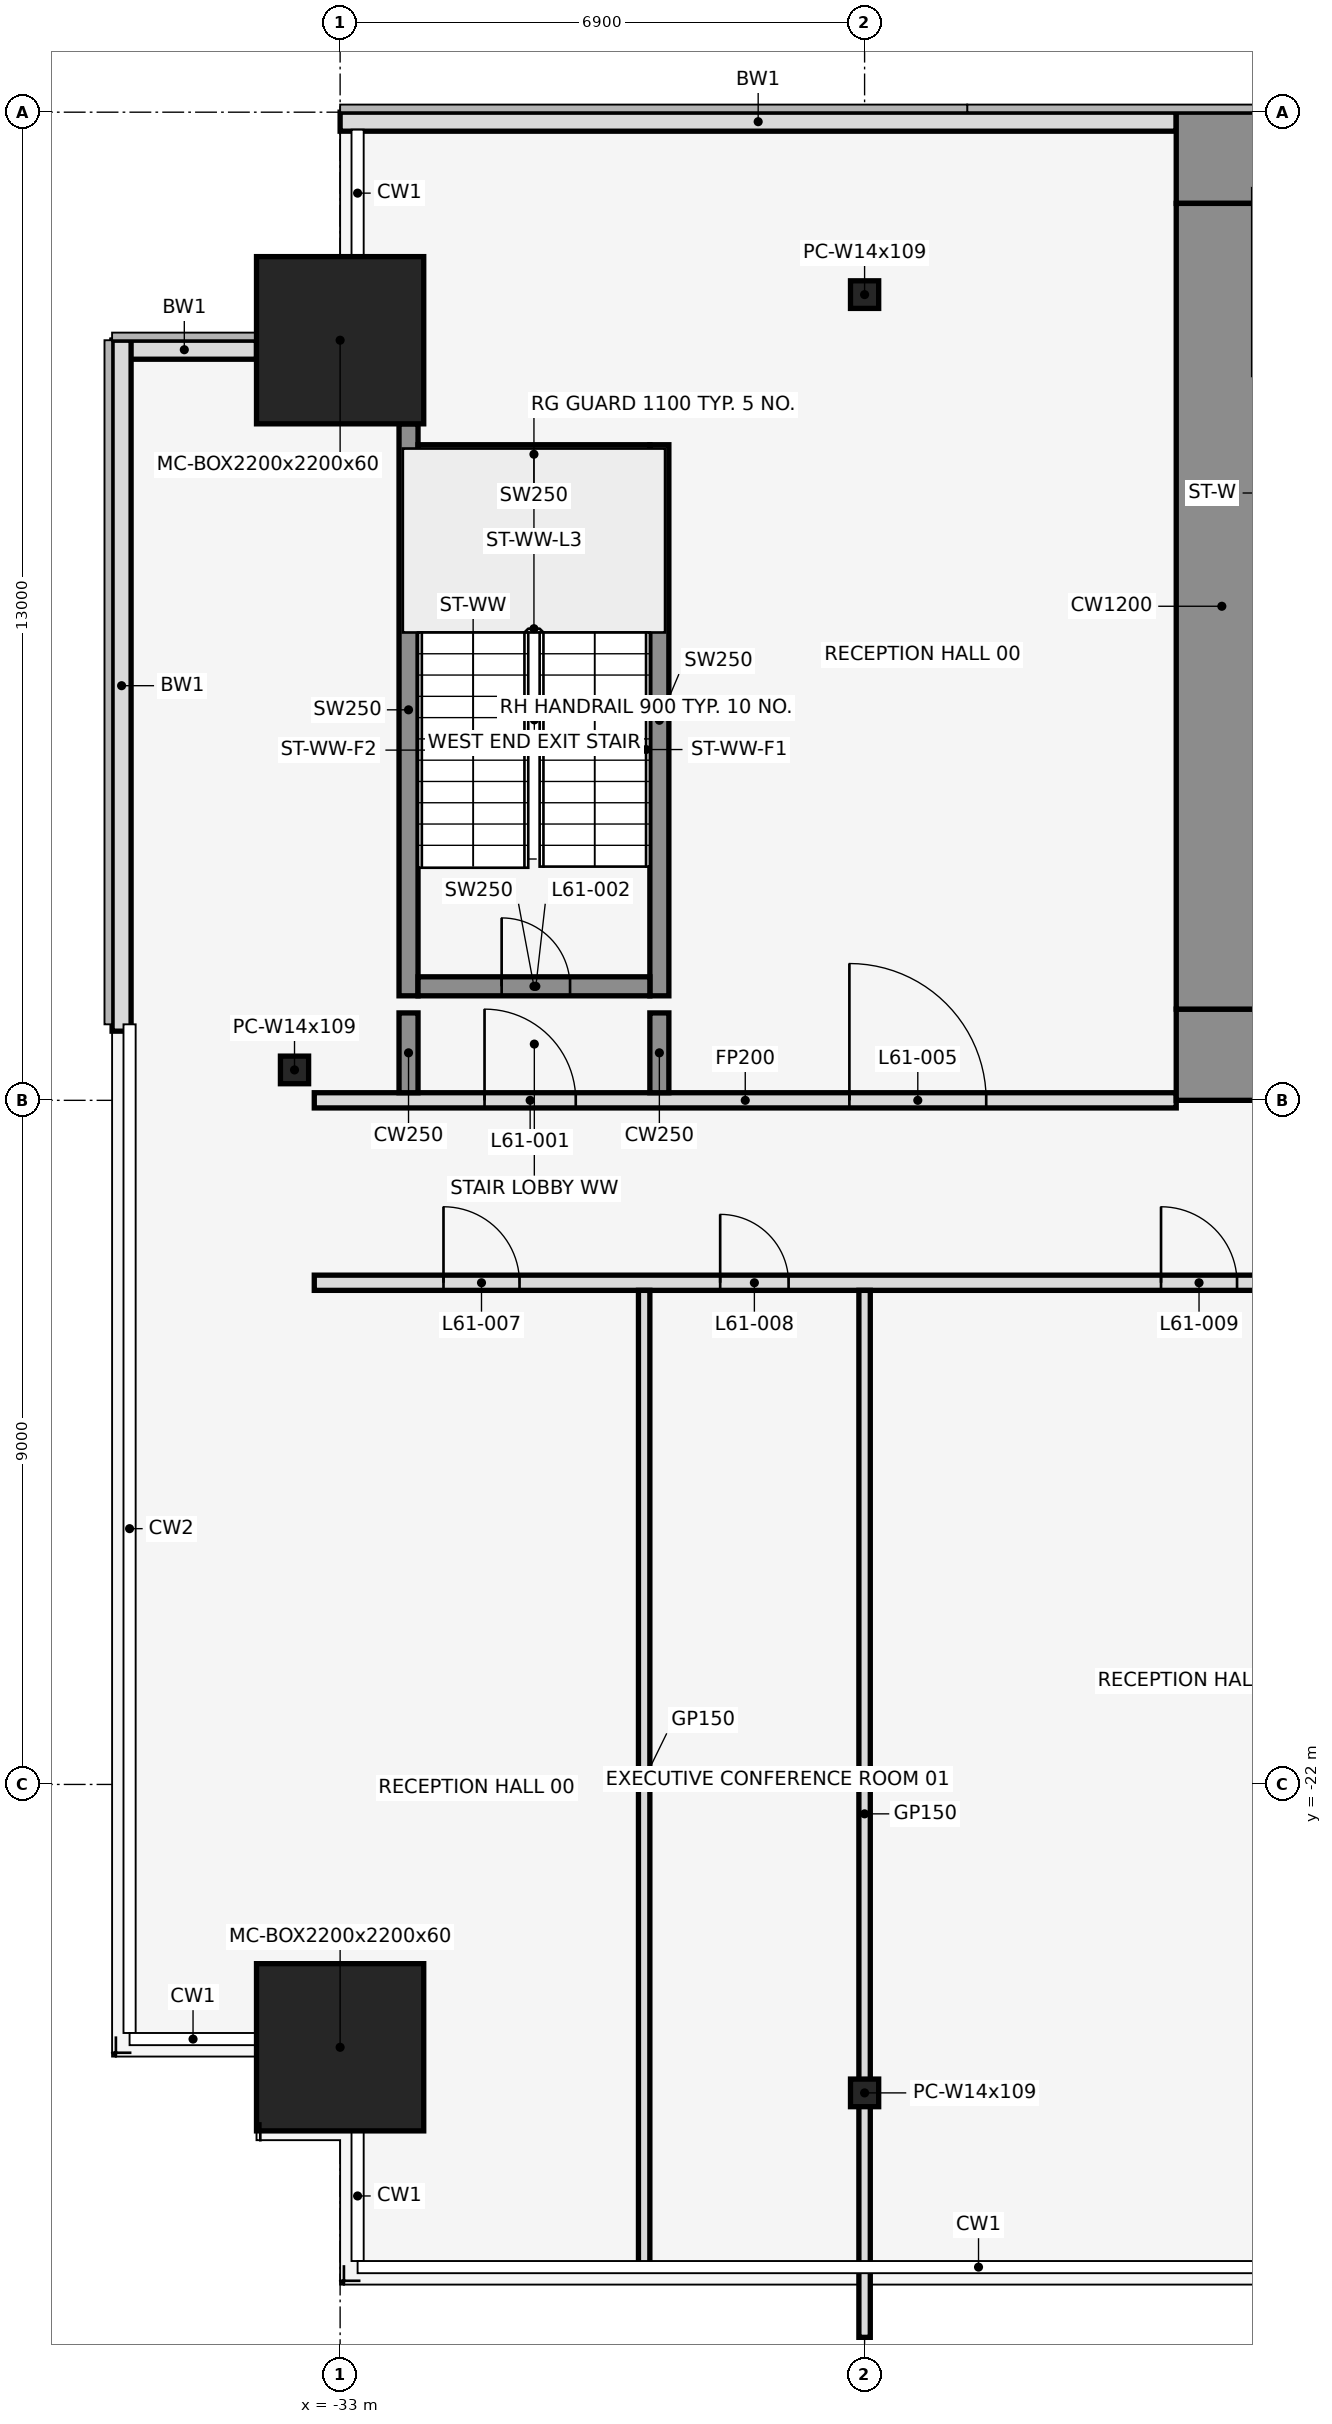
"""IFC4 building model, lengths in metres.
Left out: names, types, materials, properties, quantities, classifications, styles, units other than length and angle.
Written with IfcOpenShell. Run it as: python <this file> out.ifc"""

import sys

from ifc_helpers import new_model, si_unit, direction, frame, frame_2d, origin, origin_2d, place, context, subcontext, project, spatial, rectangle, hollow_rectangle, i_section, extrude, element, fill, save


model = new_model("IFC4")
c1 = context("Model", 3, precision=1e-05, world=origin(), true_north=direction((0.0, 1.0)))
c2 = subcontext(c1, "Body", "Model", "MODEL_VIEW")
j1 = project(units=[si_unit("LENGTHUNIT", "METRE"), si_unit("PLANEANGLEUNIT", "RADIAN")], contexts=[c1])
p1 = place(None, origin())
s1 = spatial("IfcSite", under=j1, at=p1, CompositionType="ELEMENT")
p2 = place(p1, origin())
s2 = spatial("IfcBuilding", under=s1, at=p2, CompositionType="ELEMENT")
p3 = place(p2, frame((0.0, 0.0, 270.8)))
s3 = spatial("IfcBuildingStorey", under=s2, at=p3, CompositionType="ELEMENT", Elevation=270.8)
for number, where, z_axis, x_axis in (
    (1, (-33.0, -25.458, 0.0), (0.0, 0.0, 1.0), (1.0, 0.0, 0.0)),
    (2, (-33.0, -3.0, 0.0), (0.0, 0.0, 1.0), (1.0, 0.0, 0.0)),
):
    element("IfcColumn", number, at=place(p3, frame(where, z_axis=z_axis, x_axis=x_axis)), inside=s3, PredefinedType="COLUMN", context=c2, shape_type="SweptSolid", body=[
        extrude(hollow_rectangle(XDim=2.2, YDim=2.2, WallThickness=0.06, at=origin_2d()), origin(), (0.0, 0.0, 1.0), 4.2),
    ])
for number, where, z_axis, x_axis in (
    (3, (-26.1, -26.058, 0.0), (0.0, 0.0, 1.0), (1.0, 0.0, 0.0)),
    (4, (-26.1, -2.4, 0.0), (0.0, 0.0, 1.0), (1.0, 0.0, 0.0)),
    (5, (-33.6, -12.6, 0.0), (0.0, 0.0, 1.0), (1.0, 0.0, 0.0)),
):
    element("IfcColumn", number, at=place(p3, frame(where, z_axis=z_axis, x_axis=x_axis)), inside=s3, PredefinedType="COLUMN", context=c2, shape_type="SweptSolid", body=[
        extrude(i_section(OverallWidth=0.371, OverallDepth=0.363, WebThickness=0.013, FlangeThickness=0.022, at=origin_2d()), origin(), (0.0, 0.0, 1.0), 4.2),
    ])
p4 = place(p3, frame((-22.0, -0.125, 0.0), z_axis=(0.0, 0.0, 1.0), x_axis=(-1.0, 0.0, 0.0)))
e6 = element("IfcWall", 6, at=p4, inside=s3, PredefinedType="STANDARD", context=c2, shape_type="SweptSolid", body=[
    extrude(rectangle(XDim=11.0, YDim=0.25, at=frame_2d((5.5, 0.0))), origin(), (0.0, 0.0, 1.0), 4.05),
])
p5 = place(p3, frame((-34.1, -3.125, 0.0), z_axis=(0.0, 0.0, 1.0), x_axis=(-1.0, 0.0, 0.0)))
e7 = element("IfcWall", 7, at=p5, inside=s3, PredefinedType="STANDARD", context=c2, shape_type="SweptSolid", body=[
    extrude(rectangle(XDim=1.9, YDim=0.25, at=frame_2d((0.95, 0.0))), origin(), (0.0, 0.0, 1.0), 4.05),
])
p6 = place(p3, frame((-35.875, -3.0, 0.0), z_axis=(0.0, 0.0, 1.0), x_axis=(0.0, -1.0, 0.0)))
e8 = element("IfcWall", 8, at=p6, inside=s3, PredefinedType="STANDARD", context=c2, shape_type="SweptSolid", body=[
    extrude(rectangle(XDim=9.09, YDim=0.25, at=frame_2d((4.545, 0.0))), origin(), (0.0, 0.0, 1.0), 4.05),
])
p7 = place(p3, frame((-32.1, -11.625, 0.0), z_axis=(0.0, 0.0, 1.0), x_axis=(0.0, 1.0, 0.0)))
e9 = element("IfcWall", 9, at=p7, inside=s3, PredefinedType="SHEAR", context=c2, shape_type="SweptSolid", body=[
    extrude(rectangle(XDim=7.525, YDim=0.25, at=frame_2d((3.762, 0.0))), origin(), (0.0, 0.0, 1.0), 4.2),
])
p8 = place(p3, frame((-28.8, -11.625, 0.0), z_axis=(0.0, 0.0, 1.0), x_axis=(0.0, 1.0, 0.0)))
e10 = element("IfcWall", 10, at=p8, inside=s3, PredefinedType="SHEAR", context=c2, shape_type="SweptSolid", body=[
    extrude(rectangle(XDim=7.25, YDim=0.25, at=frame_2d((3.625, 0.0))), origin(), (0.0, 0.0, 1.0), 4.2),
])
p9 = place(p3, frame((-31.975, -11.5, 0.0), z_axis=(0.0, 0.0, 1.0), x_axis=(1.0, 0.0, 0.0)))
e11 = element("IfcWall", 11, at=p9, inside=s3, PredefinedType="SHEAR", context=c2, shape_type="SweptSolid", body=[
    extrude(rectangle(XDim=3.05, YDim=0.25, at=frame_2d((1.525, 0.0))), origin(), (0.0, 0.0, 1.0), 4.2),
])
p10 = place(p9, frame((1.1, 0.0, 0.0)))
e12 = element("IfcOpeningElement", 12, at=p10, cuts=e11, PredefinedType="OPENING", context=c2, shape_type="SweptSolid", body=[
    extrude(rectangle(XDim=0.9, YDim=2.1, at=frame_2d((0.45, 1.05))), frame((0.0, 0.137, 0.0), z_axis=(0.0, -1.0, 0.0), x_axis=(1.0, 0.0, 0.0)), (0.0, 0.0, 1.0), 0.274),
])
p11 = place(p3, frame((-31.975, -4.5, 0.0), z_axis=(0.0, 0.0, 1.0), x_axis=(1.0, 0.0, 0.0)))
e13 = element("IfcWall", 13, at=p11, inside=s3, PredefinedType="SHEAR", context=c2, shape_type="SweptSolid", body=[
    extrude(rectangle(XDim=3.05, YDim=0.25, at=frame_2d((1.525, 0.0))), origin(), (0.0, 0.0, 1.0), 4.2),
])
p12 = place(p3, frame((-33.34, -15.4, 0.0), z_axis=(0.0, 0.0, 1.0), x_axis=(1.0, 0.0, 0.0)))
e14 = element("IfcWall", 14, at=p12, inside=s3, PredefinedType="PARTITIONING", context=c2, shape_type="SweptSolid", body=[
    extrude(rectangle(XDim=31.94, YDim=0.2, at=frame_2d((15.97, 0.0))), origin(), (0.0, 0.0, 1.0), 3.118),
])
p13 = place(p12, frame((1.7, 0.0, 0.0)))
e15 = element("IfcOpeningElement", 15, at=p13, cuts=e14, PredefinedType="OPENING", context=c2, shape_type="SweptSolid", body=[
    extrude(rectangle(XDim=1.0, YDim=2.1, at=frame_2d((0.5, 1.05))), frame((0.0, 0.112, 0.0), z_axis=(0.0, -1.0, 0.0), x_axis=(1.0, 0.0, 0.0)), (0.0, 0.0, 1.0), 0.224),
])
p14 = place(p12, frame((5.34, 0.0, 0.0)))
e16 = element("IfcOpeningElement", 16, at=p14, cuts=e14, PredefinedType="OPENING", context=c2, shape_type="SweptSolid", body=[
    extrude(rectangle(XDim=0.9, YDim=2.1, at=frame_2d((0.45, 1.05))), frame((0.0, 0.112, 0.0), z_axis=(0.0, -1.0, 0.0), x_axis=(1.0, 0.0, 0.0)), (0.0, 0.0, 1.0), 0.224),
])
p15 = place(p12, frame((11.14, 0.0, 0.0)))
e17 = element("IfcOpeningElement", 17, at=p15, cuts=e14, PredefinedType="OPENING", context=c2, shape_type="SweptSolid", body=[
    extrude(rectangle(XDim=1.0, YDim=2.1, at=frame_2d((0.5, 1.05))), frame((0.0, 0.112, 0.0), z_axis=(0.0, -1.0, 0.0), x_axis=(1.0, 0.0, 0.0)), (0.0, 0.0, 1.0), 0.224),
])
p16 = place(p12, frame((18.34, 0.0, 0.0)))
e18 = element("IfcOpeningElement", 18, at=p16, cuts=e14, PredefinedType="OPENING", context=c2, shape_type="SweptSolid", body=[
    extrude(rectangle(XDim=1.0, YDim=2.1, at=frame_2d((0.5, 1.05))), frame((0.0, 0.112, 0.0), z_axis=(0.0, -1.0, 0.0), x_axis=(1.0, 0.0, 0.0)), (0.0, 0.0, 1.0), 0.224),
])
p17 = place(p3, frame((-33.34, -13.0, 0.0), z_axis=(0.0, 0.0, 1.0), x_axis=(1.0, 0.0, 0.0)))
e19 = element("IfcWall", 19, at=p17, inside=s3, PredefinedType="PARTITIONING", context=c2, shape_type="SweptSolid", body=[
    extrude(rectangle(XDim=11.34, YDim=0.2, at=frame_2d((5.67, 0.0))), origin(), (0.0, 0.0, 1.0), 3.118),
])
p18 = place(p17, frame((2.24, 0.0, 0.0)))
e20 = element("IfcOpeningElement", 20, at=p18, cuts=e19, PredefinedType="OPENING", context=c2, shape_type="SweptSolid", body=[
    extrude(rectangle(XDim=1.2, YDim=2.1, at=frame_2d((0.6, 1.05))), frame((0.0, 0.112, 0.0), z_axis=(0.0, -1.0, 0.0), x_axis=(1.0, 0.0, 0.0)), (0.0, 0.0, 1.0), 0.224),
])
p19 = place(p17, frame((7.04, 0.0, 0.0)))
e21 = element("IfcOpeningElement", 21, at=p19, cuts=e19, PredefinedType="OPENING", context=c2, shape_type="SweptSolid", body=[
    extrude(rectangle(XDim=1.8, YDim=2.1, at=frame_2d((0.9, 1.05))), frame((0.0, 0.112, 0.0), z_axis=(0.0, -1.0, 0.0), x_axis=(1.0, 0.0, 0.0)), (0.0, 0.0, 1.0), 0.224),
])
p20 = place(p3, frame((-32.1, -12.9, 0.0), z_axis=(0.0, 0.0, 1.0), x_axis=(0.0, 1.0, 0.0)))
e22 = element("IfcWall", 22, at=p20, inside=s3, PredefinedType="SHEAR", context=c2, shape_type="SweptSolid", body=[
    extrude(rectangle(XDim=1.05, YDim=0.25, at=frame_2d((0.525, 0.0))), origin(), (0.0, 0.0, 1.0), 4.2),
])
p21 = place(p3, frame((-29.0, -28.37, 0.0), z_axis=(0.0, 0.0, 1.0), x_axis=(0.0, 1.0, 0.0)))
e23 = element("IfcWall", 23, at=p21, inside=s3, PredefinedType="PARTITIONING", context=c2, shape_type="SweptSolid", body=[
    extrude(rectangle(XDim=12.87, YDim=0.15, at=frame_2d((6.435, 0.0))), origin(), (0.0, 0.0, 1.0), 3.118),
])
p22 = place(p3, frame((-28.8, -12.9, 0.0), z_axis=(0.0, 0.0, 1.0), x_axis=(0.0, 1.0, 0.0)))
e24 = element("IfcWall", 24, at=p22, inside=s3, PredefinedType="SHEAR", context=c2, shape_type="SweptSolid", body=[
    extrude(rectangle(XDim=1.05, YDim=0.25, at=frame_2d((0.525, 0.0))), origin(), (0.0, 0.0, 1.0), 4.2),
])
p23 = place(p3, frame((-26.1, -29.274, 0.0), z_axis=(0.0, 0.0, 1.0), x_axis=(0.0, 1.0, 0.0)))
e25 = element("IfcWall", 25, at=p23, inside=s3, PredefinedType="PARTITIONING", context=c2, shape_type="SweptSolid", body=[
    extrude(rectangle(XDim=13.774, YDim=0.15, at=frame_2d((6.887, 0.0))), origin(), (0.0, 0.0, 1.0), 3.118),
])
p24 = place(p3, frame((-22.0, -0.6, 0.0), z_axis=(0.0, 0.0, 1.0), x_axis=(1.0, 0.0, 0.0)))
e26 = element("IfcWall", 26, at=p24, inside=s3, PredefinedType="SHEAR", context=c2, shape_type="SweptSolid", body=[
    extrude(rectangle(XDim=44.0, YDim=1.2, at=frame_2d((22.0, 0.0))), origin(), (0.0, 0.0, 1.0), 4.2),
])
p25 = place(p24, frame((18.55, 0.0, 0.0)))
e27 = element("IfcOpeningElement", 27, at=p25, cuts=e26, PredefinedType="OPENING", context=c2, shape_type="SweptSolid", body=[
    extrude(rectangle(XDim=0.9, YDim=2.1, at=frame_2d((0.45, 1.05))), frame((0.0, 0.612, 0.0), z_axis=(0.0, -1.0, 0.0), x_axis=(1.0, 0.0, 0.0)), (0.0, 0.0, 1.0), 1.224),
])
p26 = place(p24, frame((24.55, 0.0, 0.0)))
e28 = element("IfcOpeningElement", 28, at=p26, cuts=e26, PredefinedType="OPENING", context=c2, shape_type="SweptSolid", body=[
    extrude(rectangle(XDim=0.9, YDim=2.1, at=frame_2d((0.45, 1.05))), frame((0.0, 0.612, 0.0), z_axis=(0.0, -1.0, 0.0), x_axis=(1.0, 0.0, 0.0)), (0.0, 0.0, 1.0), 1.224),
])
p27 = place(p3, frame((-22.0, -12.4, 0.0), z_axis=(0.0, 0.0, 1.0), x_axis=(1.0, 0.0, 0.0)))
e29 = element("IfcWall", 29, at=p27, inside=s3, PredefinedType="SHEAR", context=c2, shape_type="SweptSolid", body=[
    extrude(rectangle(XDim=44.0, YDim=1.2, at=frame_2d((22.0, 0.0))), origin(), (0.0, 0.0, 1.0), 4.2),
])
p28 = place(p27, frame((2.2, 0.0, 0.0)))
e30 = element("IfcOpeningElement", 30, at=p28, cuts=e29, PredefinedType="OPENING", context=c2, shape_type="SweptSolid", body=[
    extrude(rectangle(XDim=1.2, YDim=2.1, at=frame_2d((0.6, 1.05))), frame((0.0, 0.612, 0.0), z_axis=(0.0, -1.0, 0.0), x_axis=(1.0, 0.0, 0.0)), (0.0, 0.0, 1.0), 1.224),
])
p29 = place(p27, frame((21.4, 0.0, 0.0)))
e31 = element("IfcOpeningElement", 31, at=p29, cuts=e29, PredefinedType="OPENING", context=c2, shape_type="SweptSolid", body=[
    extrude(rectangle(XDim=1.2, YDim=2.1, at=frame_2d((0.6, 1.05))), frame((0.0, 0.612, 0.0), z_axis=(0.0, -1.0, 0.0), x_axis=(1.0, 0.0, 0.0)), (0.0, 0.0, 1.0), 1.224),
])
p30 = place(p27, frame((40.6, 0.0, 0.0)))
e32 = element("IfcOpeningElement", 32, at=p30, cuts=e29, PredefinedType="OPENING", context=c2, shape_type="SweptSolid", body=[
    extrude(rectangle(XDim=1.2, YDim=2.1, at=frame_2d((0.6, 1.05))), frame((0.0, 0.612, 0.0), z_axis=(0.0, -1.0, 0.0), x_axis=(1.0, 0.0, 0.0)), (0.0, 0.0, 1.0), 1.224),
])
p31 = place(p27, frame((16.0, 0.0, 0.0)))
e33 = element("IfcOpeningElement", 33, at=p31, cuts=e29, PredefinedType="OPENING", context=c2, shape_type="SweptSolid", body=[
    extrude(rectangle(XDim=1.8, YDim=2.1, at=frame_2d((0.9, 1.05))), frame((0.0, 0.612, 0.0), z_axis=(0.0, -1.0, 0.0), x_axis=(1.0, 0.0, 0.0)), (0.0, 0.0, 1.0), 1.224),
])
p32 = place(p27, frame((6.3, 0.0, 0.0)))
e34 = element("IfcOpeningElement", 34, at=p32, cuts=e29, PredefinedType="OPENING", context=c2, shape_type="SweptSolid", body=[
    extrude(rectangle(XDim=1.2, YDim=2.1, at=frame_2d((0.6, 1.05))), frame((0.0, 0.612, 0.0), z_axis=(0.0, -1.0, 0.0), x_axis=(1.0, 0.0, 0.0)), (0.0, 0.0, 1.0), 1.224),
])
p33 = place(p27, frame((26.2, 0.0, 0.0)))
e35 = element("IfcOpeningElement", 35, at=p33, cuts=e29, PredefinedType="OPENING", context=c2, shape_type="SweptSolid", body=[
    extrude(rectangle(XDim=1.8, YDim=2.1, at=frame_2d((0.9, 1.05))), frame((0.0, 0.612, 0.0), z_axis=(0.0, -1.0, 0.0), x_axis=(1.0, 0.0, 0.0)), (0.0, 0.0, 1.0), 1.224),
])
p34 = place(p27, frame((36.5, 0.0, 0.0)))
e36 = element("IfcOpeningElement", 36, at=p34, cuts=e29, PredefinedType="OPENING", context=c2, shape_type="SweptSolid", body=[
    extrude(rectangle(XDim=1.2, YDim=2.1, at=frame_2d((0.6, 1.05))), frame((0.0, 0.612, 0.0), z_axis=(0.0, -1.0, 0.0), x_axis=(1.0, 0.0, 0.0)), (0.0, 0.0, 1.0), 1.224),
])
p35 = place(p3, frame((-21.4, -11.8, 0.0), z_axis=(0.0, 0.0, 1.0), x_axis=(0.0, 1.0, 0.0)))
e37 = element("IfcWall", 37, at=p35, inside=s3, PredefinedType="SHEAR", context=c2, shape_type="SweptSolid", body=[
    extrude(rectangle(XDim=10.6, YDim=1.2, at=frame_2d((5.3, 0.0))), origin(), (0.0, 0.0, 1.0), 4.2),
])
p36 = place(p18, origin())
e38 = element("IfcDoor", 38, at=p36, inside=s3, OperationType="SINGLE_SWING_LEFT", PredefinedType="DOOR", context=c2, shape_type="SweptSolid", body=[
    extrude(rectangle(XDim=1.2, YDim=2.1, at=frame_2d((0.6, 1.05))), frame((0.0, 0.025, 0.0), z_axis=(0.0, -1.0, 0.0), x_axis=(1.0, 0.0, 0.0)), (0.0, 0.0, 1.0), 0.05),
])
fill(e20, e38)
p37 = place(p10, origin())
e39 = element("IfcDoor", 39, at=p37, inside=s3, OperationType="SINGLE_SWING_LEFT", PredefinedType="DOOR", context=c2, shape_type="SweptSolid", body=[
    extrude(rectangle(XDim=0.9, YDim=2.1, at=frame_2d((0.45, 1.05))), frame((0.0, 0.025, 0.0), z_axis=(0.0, -1.0, 0.0), x_axis=(1.0, 0.0, 0.0)), (0.0, 0.0, 1.0), 0.05),
])
fill(e12, e39)
p38 = place(p19, origin())
e40 = element("IfcDoor", 40, at=p38, inside=s3, OperationType="SINGLE_SWING_LEFT", PredefinedType="DOOR", context=c2, shape_type="SweptSolid", body=[
    extrude(rectangle(XDim=1.8, YDim=2.1, at=frame_2d((0.9, 1.05))), frame((0.0, 0.025, 0.0), z_axis=(0.0, -1.0, 0.0), x_axis=(1.0, 0.0, 0.0)), (0.0, 0.0, 1.0), 0.05),
])
fill(e21, e40)
p39 = place(p13, frame((1.0, 0.0, 0.0), z_axis=(0.0, 0.0, 1.0), x_axis=(-1.0, 0.0, 0.0)))
e41 = element("IfcDoor", 41, at=p39, inside=s3, OperationType="SINGLE_SWING_LEFT", PredefinedType="DOOR", context=c2, shape_type="SweptSolid", body=[
    extrude(rectangle(XDim=1.0, YDim=2.1, at=frame_2d((0.5, 1.05))), frame((0.0, 0.025, 0.0), z_axis=(0.0, -1.0, 0.0), x_axis=(1.0, 0.0, 0.0)), (0.0, 0.0, 1.0), 0.05),
])
fill(e15, e41)
p40 = place(p14, frame((0.9, 0.0, 0.0), z_axis=(0.0, 0.0, 1.0), x_axis=(-1.0, 0.0, 0.0)))
e42 = element("IfcDoor", 42, at=p40, inside=s3, OperationType="SINGLE_SWING_RIGHT", PredefinedType="DOOR", context=c2, shape_type="SweptSolid", body=[
    extrude(rectangle(XDim=0.9, YDim=2.1, at=frame_2d((0.45, 1.05))), frame((0.0, 0.025, 0.0), z_axis=(0.0, -1.0, 0.0), x_axis=(1.0, 0.0, 0.0)), (0.0, 0.0, 1.0), 0.05),
])
fill(e16, e42)
p41 = place(p15, frame((1.0, 0.0, 0.0), z_axis=(0.0, 0.0, 1.0), x_axis=(-1.0, 0.0, 0.0)))
e43 = element("IfcDoor", 43, at=p41, inside=s3, OperationType="SINGLE_SWING_RIGHT", PredefinedType="DOOR", context=c2, shape_type="SweptSolid", body=[
    extrude(rectangle(XDim=1.0, YDim=2.1, at=frame_2d((0.5, 1.05))), frame((0.0, 0.025, 0.0), z_axis=(0.0, -1.0, 0.0), x_axis=(1.0, 0.0, 0.0)), (0.0, 0.0, 1.0), 0.05),
])
fill(e17, e43)
save(model, sys.argv[1])
